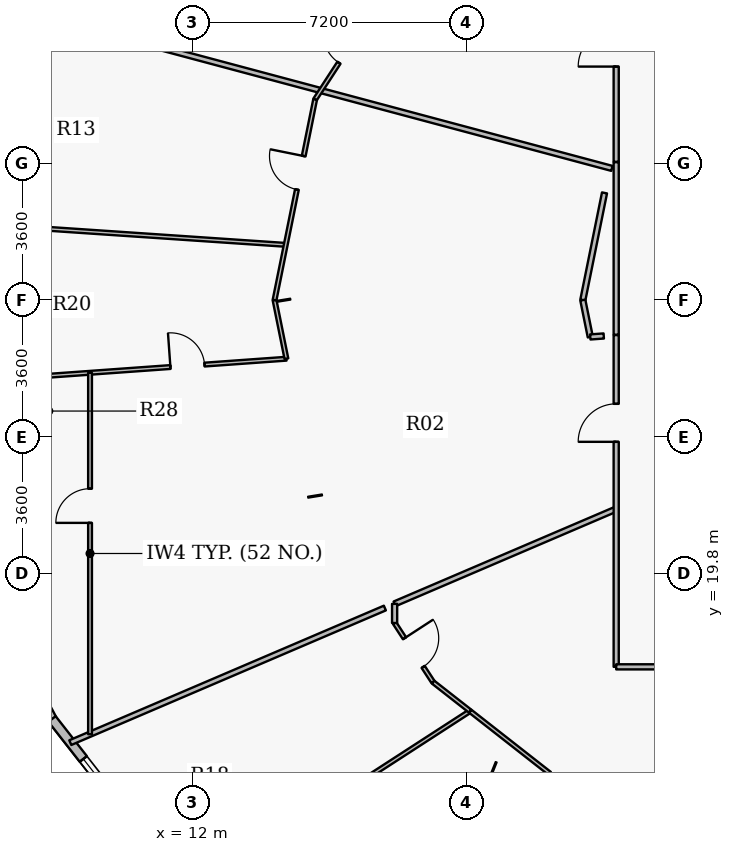
"""IFC4 building model, lengths in metres.
Left out: names, types, materials, properties, quantities, classifications, styles, units other than length and angle.
Written with IfcOpenShell. Run it as: python <this file> out.ifc"""

import sys

from ifc_helpers import new_model, si_unit, direction, frame, frame_2d, origin, origin_2d, place, context, subcontext, project, spatial, rectangle, extrude, source, transform, mapped, element, fill, save


model = new_model("IFC4")
c1 = context("Model", 3, precision=1e-05, world=origin(), true_north=direction((0.0, 1.0)))
c2 = subcontext(c1, "Body", "Model", "MODEL_VIEW")
j1 = project(units=[si_unit("LENGTHUNIT", "METRE"), si_unit("PLANEANGLEUNIT", "RADIAN")], contexts=[c1])
p1 = place(None, origin())
s1 = spatial("IfcSite", under=j1, at=p1, CompositionType="ELEMENT")
p2 = place(p1, origin())
s2 = spatial("IfcBuilding", under=s1, at=p2, CompositionType="ELEMENT")
p3 = place(p2, frame((0.0, 0.0, 74.4)))
s3 = spatial("IfcBuildingStorey", under=s2, at=p3, CompositionType="ELEMENT", Elevation=74.4)
p4 = place(p3, frame((8.305, 15.977, 0.0), z_axis=(0.0, 0.0, 1.0), x_axis=(-0.467662443071, 0.883907144072, 0.0)))
e1 = element("IfcWall", 1, at=p4, inside=s3, PredefinedType="SOLIDWALL", context=c2, shape_type="SweptSolid", body=[
    extrude(rectangle(XDim=3.984, YDim=0.24, at=frame_2d((1.992, 0.0))), origin(), (0.0, 0.0, 1.0), 3.95),
])
p5 = place(p3, frame((10.85, 12.725, 0.0), z_axis=(0.0, 0.0, 1.0), x_axis=(-0.616295508253, 0.787514981767, 0.0)))
e2 = element("IfcWall", 2, at=p5, inside=s3, PredefinedType="SOLIDWALL", context=c2, shape_type="SweptSolid", body=[
    extrude(rectangle(XDim=4.129, YDim=0.24, at=frame_2d((2.065, 0.0))), origin(), (0.0, 0.0, 1.0), 3.95),
])
p6 = place(p5, frame((0.795, 0.0, 0.9)))
e3 = element("IfcOpeningElement", 3, at=p6, cuts=e2, PredefinedType="OPENING", context=c2, shape_type="SweptSolid", body=[
    extrude(rectangle(XDim=2.0, YDim=1.75, at=origin_2d()), frame((1.0, 0.13, 0.875), z_axis=(0.0, -1.0, 0.0), x_axis=(1.0, 0.0, 0.0)), (0.0, 0.0, 1.0), 0.26),
])
p7 = place(p3, frame((5.129, 29.083, 0.0), z_axis=(0.0, 0.0, 1.0), x_axis=(0.997731551972, -0.067318275369, 0.0)))
e4 = element("IfcWall", 4, at=p7, inside=s3, PredefinedType="PARTITIONING", context=c2, shape_type="SweptSolid", body=[
    extrude(rectangle(XDim=9.346, YDim=0.1, at=frame_2d((4.673, 0.0))), origin(), (0.0, 0.0, 1.0), 3.335),
])
p8 = place(p3, frame((5.142, 24.789, 0.0), z_axis=(0.0, 0.0, 1.0), x_axis=(0.997443041409, 0.071465929957, 0.0)))
e5 = element("IfcWall", 5, at=p8, inside=s3, PredefinedType="PARTITIONING", context=c2, shape_type="SweptSolid", body=[
    extrude(rectangle(XDim=9.354, YDim=0.1, at=frame_2d((4.677, 0.0))), origin(), (0.0, 0.0, 1.0), 3.335),
])
p9 = place(p8, frame((6.293, 0.0, 0.0)))
e6 = element("IfcOpeningElement", 6, at=p9, cuts=e5, PredefinedType="OPENING", context=c2, shape_type="SweptSolid", body=[
    extrude(rectangle(XDim=0.9, YDim=2.1, at=origin_2d()), frame((0.45, 0.06, 1.05), z_axis=(0.0, -1.0, 0.0), x_axis=(1.0, 0.0, 0.0)), (0.0, 0.0, 1.0), 0.12),
])
p10 = place(p8, frame((0.75, 0.0, 0.0)))
e7 = element("IfcOpeningElement", 7, at=p10, cuts=e5, PredefinedType="OPENING", context=c2, shape_type="SweptSolid", body=[
    extrude(rectangle(XDim=0.82, YDim=2.1, at=origin_2d()), frame((0.41, 0.06, 1.05), z_axis=(0.0, -1.0, 0.0), x_axis=(1.0, 0.0, 0.0)), (0.0, 0.0, 1.0), 0.12),
])
p11 = place(p3, frame((6.623, 34.854, 0.0), z_axis=(0.0, 0.0, 1.0), x_axis=(0.966073053026, -0.258268961003, 0.0)))
e8 = element("IfcWall", 8, at=p11, inside=s3, PredefinedType="PARTITIONING", context=c2, shape_type="SweptSolid", body=[
    extrude(rectangle(XDim=16.991, YDim=0.135, at=frame_2d((8.495, 0.0))), origin(), (0.0, 0.0, 1.0), 3.335),
])
p12 = place(p3, frame((8.785, 15.356, 0.0), z_axis=(0.0, 0.0, 1.0), x_axis=(0.919377695517, 0.393375968998, 0.0)))
e9 = element("IfcWall", 9, at=p12, inside=s3, PredefinedType="PARTITIONING", context=c2, shape_type="SweptSolid", body=[
    extrude(rectangle(XDim=9.003, YDim=0.135, at=frame_2d((4.502, 0.0))), origin(), (0.0, 0.0, 1.0), 3.335),
])
p13 = place(p3, frame((9.305, 15.578, 0.0), z_axis=(0.0, 0.0, 1.0), x_axis=(0.0, 1.0, 0.0)))
e10 = element("IfcWall", 10, at=p13, inside=s3, PredefinedType="PARTITIONING", context=c2, shape_type="SweptSolid", body=[
    extrude(rectangle(XDim=9.509, YDim=0.1, at=frame_2d((4.755, 0.0))), origin(), (0.0, 0.0, 1.0), 3.285),
])
p14 = place(p13, frame((5.56, 0.0, 0.0)))
e11 = element("IfcOpeningElement", 11, at=p14, cuts=e10, PredefinedType="OPENING", context=c2, shape_type="SweptSolid", body=[
    extrude(rectangle(XDim=0.9, YDim=2.1, at=origin_2d()), frame((0.45, 0.06, 1.05), z_axis=(0.0, -1.0, 0.0), x_axis=(1.0, 0.0, 0.0)), (0.0, 0.0, 1.0), 0.12),
])
p15 = place(p3, frame((12.133, 11.542, 0.0), z_axis=(0.0, 0.0, 1.0), x_axis=(0.839345439493, 0.5435984117, 0.0)))
e12 = element("IfcWall", 12, at=p15, inside=s3, PredefinedType="PARTITIONING", context=c2, shape_type="SweptSolid", body=[
    extrude(rectangle(XDim=8.543, YDim=0.1, at=frame_2d((4.271, 0.0))), origin(), (0.0, 0.0, 1.0), 3.335),
])
p16 = place(p3, frame((14.16, 27.0, 0.0), z_axis=(0.0, 0.0, 1.0), x_axis=(0.198233557602, -0.980154812588, 0.0)))
e13 = element("IfcWall", 13, at=p16, inside=s3, PredefinedType="PARTITIONING", context=c2, shape_type="SweptSolid", body=[
    extrude(rectangle(XDim=1.574, YDim=0.1, at=frame_2d((0.787, 0.0))), origin(), (0.0, 0.0, 1.0), 3.285),
])
p17 = place(p3, frame((14.16, 27.0, 0.0), z_axis=(0.0, 0.0, 1.0), x_axis=(0.198292702032, 0.980142848936, 0.0)))
e14 = element("IfcWall", 14, at=p17, inside=s3, PredefinedType="PARTITIONING", context=c2, shape_type="SweptSolid", body=[
    extrude(rectangle(XDim=5.392, YDim=0.1, at=frame_2d((2.696, 0.0))), origin(), (0.0, 0.0, 1.0), 3.285),
])
p18 = place(p17, frame((2.967, 0.0, 0.0)))
e15 = element("IfcOpeningElement", 15, at=p18, cuts=e14, PredefinedType="OPENING", context=c2, shape_type="SweptSolid", body=[
    extrude(rectangle(XDim=0.9, YDim=2.1, at=origin_2d()), frame((0.45, 0.06, 1.05), z_axis=(0.0, -1.0, 0.0), x_axis=(1.0, 0.0, 0.0)), (0.0, 0.0, 1.0), 0.12),
])
p19 = place(p3, frame((15.048, 9.127, 0.0), z_axis=(0.0, 0.0, 1.0), x_axis=(0.760804650013, 0.648980958517, 0.0)))
e16 = element("IfcWall", 16, at=p19, inside=s3, PredefinedType="PARTITIONING", context=c2, shape_type="SweptSolid", body=[
    extrude(rectangle(XDim=8.349, YDim=0.1, at=frame_2d((4.174, 0.0))), origin(), (0.0, 0.0, 1.0), 3.335),
])
p20 = place(p19, frame((5.197, 0.0, 0.0)))
e17 = element("IfcOpeningElement", 17, at=p20, cuts=e16, PredefinedType="OPENING", context=c2, shape_type="SweptSolid", body=[
    extrude(rectangle(XDim=0.9, YDim=2.1, at=origin_2d()), frame((0.45, 0.06, 1.05), z_axis=(0.0, -1.0, 0.0), x_axis=(1.0, 0.0, 0.0)), (0.0, 0.0, 1.0), 0.12),
])
p21 = place(p3, frame((15.229, 32.284, 0.0), z_axis=(0.0, 0.0, 1.0), x_axis=(0.545394142426, 0.83817971188, 0.0)))
e18 = element("IfcWall", 18, at=p21, inside=s3, PredefinedType="PARTITIONING", context=c2, shape_type="SweptSolid", body=[
    extrude(rectangle(XDim=5.688, YDim=0.1, at=frame_2d((2.844, 0.0))), origin(), (0.0, 0.0, 1.0), 3.285),
])
p22 = place(p21, frame((1.146, 0.0, 0.0)))
e19 = element("IfcOpeningElement", 19, at=p22, cuts=e18, PredefinedType="OPENING", context=c2, shape_type="SweptSolid", body=[
    extrude(rectangle(XDim=0.9, YDim=2.1, at=origin_2d()), frame((0.45, 0.06, 1.05), z_axis=(0.0, -1.0, 0.0), x_axis=(1.0, 0.0, 0.0)), (0.0, 0.0, 1.0), 0.12),
])
p23 = place(p3, frame((17.319, 18.503, 0.0), z_axis=(0.0, 0.0, 1.0), x_axis=(0.54537223853, -0.838193964092, 0.0)))
e20 = element("IfcWall", 20, at=p23, inside=s3, PredefinedType="PARTITIONING", context=c2, shape_type="SweptSolid", body=[
    extrude(rectangle(XDim=1.855, YDim=0.1, at=frame_2d((0.927, 0.0))), origin(), (0.0, 0.0, 1.0), 3.95),
])
p24 = place(p23, frame((0.478, 0.0, 0.0)))
e21 = element("IfcOpeningElement", 21, at=p24, cuts=e20, PredefinedType="OPENING", context=c2, shape_type="SweptSolid", body=[
    extrude(rectangle(XDim=0.9, YDim=2.1, at=origin_2d()), frame((0.45, 0.06, 1.05), z_axis=(0.0, -1.0, 0.0), x_axis=(1.0, 0.0, 0.0)), (0.0, 0.0, 1.0), 0.12),
])
p25 = place(p3, frame((17.319, 19.007, 0.0), z_axis=(0.0, 0.0, 1.0), x_axis=(0.919369884618, 0.393394223721, 0.0)))
e22 = element("IfcWall", 22, at=p25, inside=s3, PredefinedType="PARTITIONING", context=c2, shape_type="SweptSolid", body=[
    extrude(rectangle(XDim=6.342, YDim=0.135, at=frame_2d((3.171, 0.0))), origin(), (0.0, 0.0, 1.0), 3.95),
])
p26 = place(p3, frame((18.331, 16.948, 0.0), z_axis=(0.0, 0.0, 1.0), x_axis=(0.787379901086, -0.61646807814, 0.0)))
e23 = element("IfcWall", 23, at=p26, inside=s3, PredefinedType="PARTITIONING", context=c2, shape_type="SweptSolid", body=[
    extrude(rectangle(XDim=1.236, YDim=0.1, at=frame_2d((0.618, 0.0))), origin(), (0.0, 0.0, 1.0), 3.95),
])
p27 = place(p3, frame((19.312, 16.18, 0.0), z_axis=(0.0, 0.0, 1.0), x_axis=(0.787365097885, -0.616486984967, 0.0)))
e24 = element("IfcWall", 24, at=p27, inside=s3, PredefinedType="PARTITIONING", context=c2, shape_type="SweptSolid", body=[
    extrude(rectangle(XDim=2.652, YDim=0.1, at=frame_2d((1.326, 0.0))), origin(), (0.0, 0.0, 1.0), 3.285),
])
p28 = place(p3, frame((23.15, 17.35, 0.0), z_axis=(0.0, 0.0, 1.0), x_axis=(0.0, 1.0, 0.0)))
e25 = element("IfcWall", 25, at=p28, inside=s3, PredefinedType="PARTITIONING", context=c2, shape_type="SweptSolid", body=[
    extrude(rectangle(XDim=8.729, YDim=0.135, at=frame_2d((4.365, 0.0))), origin(), (0.0, 0.0, 1.0), 3.285),
])
p29 = place(p28, frame((5.921, 0.0, 0.0)))
e26 = element("IfcOpeningElement", 26, at=p29, cuts=e25, PredefinedType="OPENING", context=c2, shape_type="SweptSolid", body=[
    extrude(rectangle(XDim=1.0, YDim=2.15, at=origin_2d()), frame((0.5, 0.078, 1.075), z_axis=(0.0, -1.0, 0.0), x_axis=(1.0, 0.0, 0.0)), (0.0, 0.0, 1.0), 0.155),
])
p30 = place(p3, frame((23.15, 17.35, 0.0), z_axis=(0.0, 0.0, 1.0), x_axis=(1.0, 0.0, 0.0)))
e27 = element("IfcWall", 27, at=p30, inside=s3, PredefinedType="PARTITIONING", context=c2, shape_type="SweptSolid", body=[
    extrude(rectangle(XDim=7.171, YDim=0.135, at=frame_2d((3.586, 0.0))), origin(), (0.0, 0.0, 1.0), 3.285),
])
p31 = place(p30, frame((3.086, 0.0, 0.0)))
e28 = element("IfcOpeningElement", 28, at=p31, cuts=e27, PredefinedType="OPENING", context=c2, shape_type="SweptSolid", body=[
    extrude(rectangle(XDim=1.0, YDim=2.15, at=origin_2d()), frame((0.5, 0.078, 1.075), z_axis=(0.0, -1.0, 0.0), x_axis=(1.0, 0.0, 0.0)), (0.0, 0.0, 1.0), 0.155),
])
p32 = place(p3, frame((23.15, 30.638, 0.0), z_axis=(0.0, 0.0, 1.0), x_axis=(0.0, 1.0, 0.0)))
e29 = element("IfcWall", 29, at=p32, inside=s3, PredefinedType="PARTITIONING", context=c2, shape_type="SweptSolid", body=[
    extrude(rectangle(XDim=6.011, YDim=0.135, at=frame_2d((3.006, 0.0))), origin(), (0.0, 0.0, 1.0), 3.285),
])
p33 = place(p32, frame((2.506, 0.0, 0.0)))
e30 = element("IfcOpeningElement", 30, at=p33, cuts=e29, PredefinedType="OPENING", context=c2, shape_type="SweptSolid", body=[
    extrude(rectangle(XDim=1.0, YDim=2.15, at=origin_2d()), frame((0.5, 0.078, 1.075), z_axis=(0.0, -1.0, 0.0), x_axis=(1.0, 0.0, 0.0)), (0.0, 0.0, 1.0), 0.155),
])
p34 = place(p3, frame((23.15, 26.089, 0.0), z_axis=(0.0, 0.0, 1.0), x_axis=(0.0, 1.0, 0.0)))
e31 = element("IfcWall", 31, at=p34, inside=s3, PredefinedType="PARTITIONING", context=c2, shape_type="SweptSolid", body=[
    extrude(rectangle(XDim=4.539, YDim=0.135, at=frame_2d((2.27, 0.0))), origin(), (0.0, 0.0, 1.0), 3.285),
])
p35 = place(p3, frame((22.843, 29.82, 0.0), z_axis=(0.0, 0.0, 1.0), x_axis=(-0.19828576171, -0.980144253007, 0.0)))
e32 = element("IfcWall", 32, at=p35, inside=s3, PredefinedType="PARTITIONING", context=c2, shape_type="SweptSolid", body=[
    extrude(rectangle(XDim=2.877, YDim=0.135, at=frame_2d((1.439, 0.0))), origin(), (0.0, 0.0, 1.0), 3.285),
])
p36 = place(p3, frame((22.272, 27.0, 0.0), z_axis=(0.0, 0.0, 1.0), x_axis=(0.1983933715, -0.980122477114, 0.0)))
e33 = element("IfcWall", 33, at=p36, inside=s3, PredefinedType="PARTITIONING", context=c2, shape_type="SweptSolid", body=[
    extrude(rectangle(XDim=0.99, YDim=0.135, at=frame_2d((0.495, 0.0))), origin(), (0.0, 0.0, 1.0), 3.285),
])
p37 = place(p3, frame((22.468, 26.03, 0.0), z_axis=(0.0, 0.0, 1.0), x_axis=(0.997441222806, 0.071491307493, 0.0)))
e34 = element("IfcWall", 34, at=p37, inside=s3, PredefinedType="PARTITIONING", context=c2, shape_type="SweptSolid", body=[
    extrude(rectangle(XDim=0.355, YDim=0.135, at=frame_2d((0.178, 0.0))), origin(), (0.0, 0.0, 1.0), 3.95),
])
p38 = place(p3, frame((17.319, 18.503, 0.0), z_axis=(0.0, 0.0, 1.0), x_axis=(0.0, 1.0, 0.0)))
e35 = element("IfcWall", 35, at=p38, inside=s3, PredefinedType="PARTITIONING", context=c2, shape_type="SweptSolid", body=[
    extrude(rectangle(XDim=0.504, YDim=0.135, at=frame_2d((0.252, 0.0))), origin(), (0.0, 0.0, 1.0), 3.95),
])
m1 = source(origin(), c2, "Body", "SweptSolid", [
    extrude(rectangle(XDim=2.0, YDim=1.75, at=origin_2d()), frame((1.0, 0.03, 0.875), z_axis=(0.0, -1.0, 0.0), x_axis=(1.0, 0.0, 0.0)), (0.0, 0.0, 1.0), 0.06),
])
p39 = place(p6, origin())
e36 = element("IfcWindow", 36, at=p39, inside=s3, PartitioningType="DOUBLE_PANEL_VERTICAL", PredefinedType="WINDOW", context=c2, shape_type="MappedRepresentation", body=[
    mapped(m1, transform((0.0, 0.0, 0.0), x_axis=(1.0, 0.0, 0.0), y_axis=(0.0, 1.0, 0.0), z_axis=(0.0, 0.0, 1.0), scale=1.0)),
])
fill(e3, e36)
m2 = source(origin(), c2, "Body", "SweptSolid", [
    extrude(rectangle(XDim=1.0, YDim=2.15, at=origin_2d()), frame((0.5, 0.025, 1.075), z_axis=(0.0, -1.0, 0.0), x_axis=(1.0, 0.0, 0.0)), (0.0, 0.0, 1.0), 0.05),
])
p40 = place(p33, origin())
e37 = element("IfcDoor", 37, at=p40, inside=s3, OperationType="SINGLE_SWING_LEFT", PredefinedType="DOOR", context=c2, shape_type="MappedRepresentation", body=[
    mapped(m2, transform((0.0, 0.0, 0.0), x_axis=(1.0, 0.0, 0.0), y_axis=(0.0, 1.0, 0.0), z_axis=(0.0, 0.0, 1.0), scale=1.0)),
])
fill(e30, e37)
m3 = source(origin(), c2, "Body", "SweptSolid", [
    extrude(rectangle(XDim=0.9, YDim=2.1, at=origin_2d()), frame((0.45, 0.025, 1.05), z_axis=(0.0, -1.0, 0.0), x_axis=(1.0, 0.0, 0.0)), (0.0, 0.0, 1.0), 0.05),
])
p41 = place(p22, origin())
e38 = element("IfcDoor", 38, at=p41, inside=s3, OperationType="SINGLE_SWING_RIGHT", PredefinedType="DOOR", context=c2, shape_type="MappedRepresentation", body=[
    mapped(m3, transform((0.0, 0.0, 0.0), x_axis=(1.0, 0.0, 0.0), y_axis=(0.0, 1.0, 0.0), z_axis=(0.0, 0.0, 1.0), scale=1.0)),
])
fill(e19, e38)
p42 = place(p29, origin())
e39 = element("IfcDoor", 39, at=p42, inside=s3, OperationType="SINGLE_SWING_LEFT", PredefinedType="DOOR", context=c2, shape_type="MappedRepresentation", body=[
    mapped(m2, transform((0.0, 0.0, 0.0), x_axis=(1.0, 0.0, 0.0), y_axis=(0.0, 1.0, 0.0), z_axis=(0.0, 0.0, 1.0), scale=1.0)),
])
fill(e26, e39)
p43 = place(p18, origin())
e40 = element("IfcDoor", 40, at=p43, inside=s3, OperationType="SINGLE_SWING_RIGHT", PredefinedType="DOOR", context=c2, shape_type="MappedRepresentation", body=[
    mapped(m3, transform((0.0, 0.0, 0.0), x_axis=(1.0, 0.0, 0.0), y_axis=(0.0, 1.0, 0.0), z_axis=(0.0, 0.0, 1.0), scale=1.0)),
])
fill(e15, e40)
p44 = place(p9, origin())
e41 = element("IfcDoor", 41, at=p44, inside=s3, OperationType="SINGLE_SWING_LEFT", PredefinedType="DOOR", context=c2, shape_type="MappedRepresentation", body=[
    mapped(m3, transform((0.0, 0.0, 0.0), x_axis=(1.0, 0.0, 0.0), y_axis=(0.0, 1.0, 0.0), z_axis=(0.0, 0.0, 1.0), scale=1.0)),
])
fill(e6, e41)
p45 = place(p14, origin())
e42 = element("IfcDoor", 42, at=p45, inside=s3, OperationType="SINGLE_SWING_LEFT", PredefinedType="DOOR", context=c2, shape_type="MappedRepresentation", body=[
    mapped(m3, transform((0.0, 0.0, 0.0), x_axis=(1.0, 0.0, 0.0), y_axis=(0.0, 1.0, 0.0), z_axis=(0.0, 0.0, 1.0), scale=1.0)),
])
fill(e11, e42)
p46 = place(p24, origin())
e43 = element("IfcDoor", 43, at=p46, inside=s3, OperationType="SINGLE_SWING_LEFT", PredefinedType="DOOR", context=c2, shape_type="MappedRepresentation", body=[
    mapped(m3, transform((0.0, 0.0, 0.0), x_axis=(1.0, 0.0, 0.0), y_axis=(0.0, 1.0, 0.0), z_axis=(0.0, 0.0, 1.0), scale=1.0)),
])
fill(e21, e43)
save(model, sys.argv[1])
